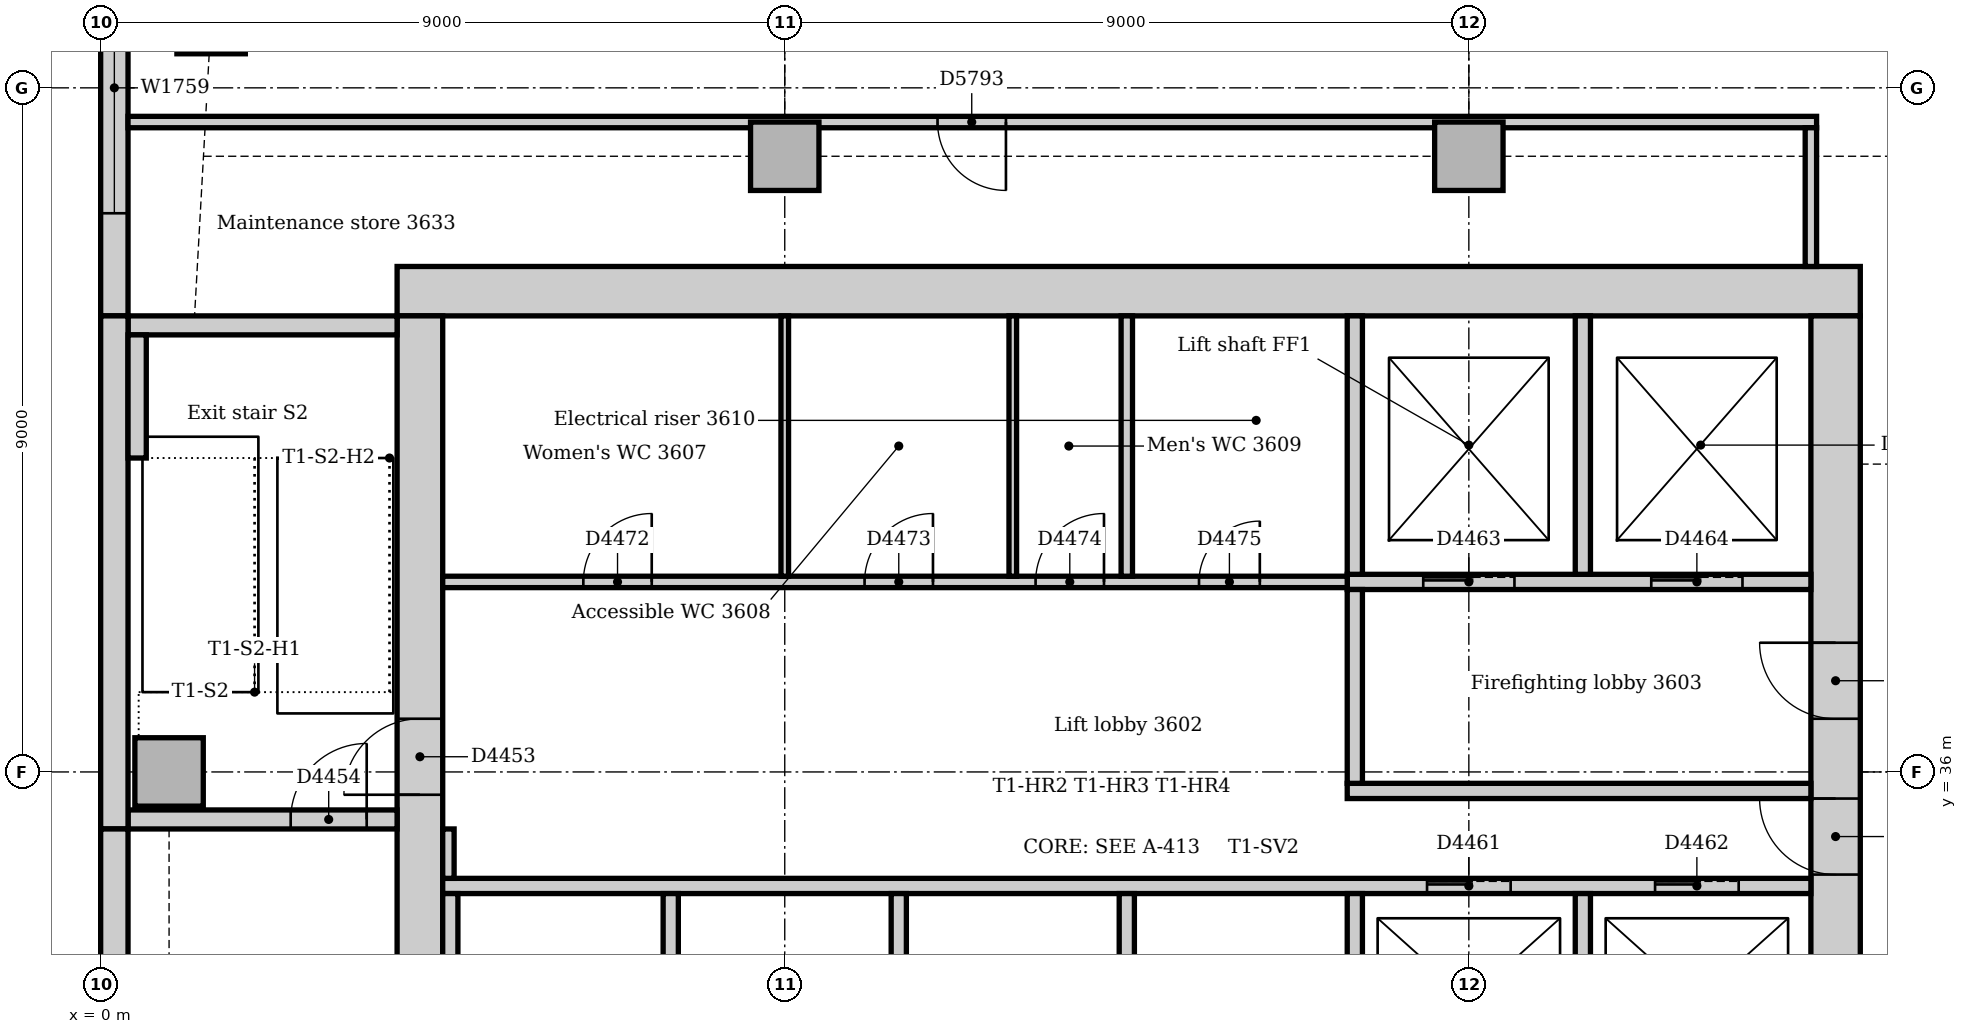
"""IFC4 building model, lengths in metres.
Left out: names, types, materials, properties, quantities, classifications, styles, units other than length and angle.
Written with IfcOpenShell. Run it as: python <this file> out.ifc"""

import sys

from ifc_helpers import new_model, si_unit, direction, frame, frame_2d, origin, origin_2d, place, context, subcontext, project, spatial, rectangle, extrude, element, fill, save


model = new_model("IFC4")
c1 = context("Model", 3, precision=1e-05, world=origin(), true_north=direction((0.0, 1.0)))
c2 = subcontext(c1, "Body", "Model", "MODEL_VIEW")
j1 = project(units=[si_unit("LENGTHUNIT", "METRE"), si_unit("PLANEANGLEUNIT", "RADIAN")], contexts=[c1])
p1 = place(None, origin())
s1 = spatial("IfcSite", under=j1, at=p1, CompositionType="ELEMENT")
p2 = place(p1, origin())
s2 = spatial("IfcBuilding", under=s1, at=p2, CompositionType="ELEMENT")
p3 = place(p2, frame((0.0, 0.0, 153.0)))
s3 = spatial("IfcBuildingStorey", under=s2, at=p3, CompositionType="ELEMENT", Elevation=153.0)
p4 = place(p3, frame((23.15, 42.325, 0.0), z_axis=(0.0, 0.0, 1.0), x_axis=(-1.0, 0.0, 0.0)))
e1 = element("IfcWall", 1, at=p4, inside=s3, PredefinedType="SOLIDWALL", context=c2, shape_type="SweptSolid", body=[
    extrude(rectangle(XDim=19.25, YDim=0.65, at=frame_2d((9.625, 0.0))), origin(), (0.0, 0.0, 1.0), 4.0),
])
p5 = place(p3, frame((22.825, 31.5, 0.0), z_axis=(0.0, 0.0, 1.0), x_axis=(0.0, 1.0, 0.0)))
e2 = element("IfcWall", 2, at=p5, inside=s3, PredefinedType="SOLIDWALL", context=c2, shape_type="SweptSolid", body=[
    extrude(rectangle(XDim=10.5, YDim=0.65, at=frame_2d((5.25, 0.0))), origin(), (0.0, 0.0, 1.0), 4.0),
])
p6 = place(p5, frame((3.15, 0.0, 0.0)))
e3 = element("IfcOpeningElement", 3, at=p6, cuts=e2, PredefinedType="OPENING", context=c2, shape_type="SweptSolid", body=[
    extrude(rectangle(XDim=1.0, YDim=2.1, at=frame_2d((0.5, 1.05))), frame((0.0, 0.335, 0.0), z_axis=(0.0, -1.0, 0.0), x_axis=(1.0, 0.0, 0.0)), (0.0, 0.0, 1.0), 0.67),
])
p7 = place(p5, frame((5.2, 0.0, 0.0)))
e4 = element("IfcOpeningElement", 4, at=p7, cuts=e2, PredefinedType="OPENING", context=c2, shape_type="SweptSolid", body=[
    extrude(rectangle(XDim=1.0, YDim=2.1, at=frame_2d((0.5, 1.05))), frame((0.0, 0.335, 0.0), z_axis=(0.0, -1.0, 0.0), x_axis=(1.0, 0.0, 0.0)), (0.0, 0.0, 1.0), 0.67),
])
p8 = place(p3, frame((4.2, 42.0, 0.0), z_axis=(0.0, 0.0, 1.0), x_axis=(0.0, -1.0, 0.0)))
e5 = element("IfcWall", 5, at=p8, inside=s3, PredefinedType="SOLIDWALL", context=c2, shape_type="SweptSolid", body=[
    extrude(rectangle(XDim=10.5, YDim=0.6, at=frame_2d((5.25, 0.0))), origin(), (0.0, 0.0, 1.0), 4.0),
])
p9 = place(p8, frame((5.3, 0.0, 0.0)))
e6 = element("IfcOpeningElement", 6, at=p9, cuts=e5, PredefinedType="OPENING", context=c2, shape_type="SweptSolid", body=[
    extrude(rectangle(XDim=1.0, YDim=2.1, at=frame_2d((0.5, 1.05))), frame((0.0, 0.31, 0.0), z_axis=(0.0, -1.0, 0.0), x_axis=(1.0, 0.0, 0.0)), (0.0, 0.0, 1.0), 0.62),
])
p10 = place(p3, frame((0.36, 35.375, 0.0), z_axis=(0.0, 0.0, 1.0), x_axis=(1.0, 0.0, 0.0)))
e7 = element("IfcWall", 7, at=p10, inside=s3, PredefinedType="SOLIDWALL", context=c2, shape_type="SweptSolid", body=[
    extrude(rectangle(XDim=3.54, YDim=0.25, at=frame_2d((1.77, 0.0))), origin(), (0.0, 0.0, 1.0), 4.0),
])
p11 = place(p10, frame((2.14, 0.0, 0.0)))
e8 = element("IfcOpeningElement", 8, at=p11, cuts=e7, PredefinedType="OPENING", context=c2, shape_type="SweptSolid", body=[
    extrude(rectangle(XDim=1.0, YDim=2.1, at=frame_2d((0.5, 1.05))), frame((0.0, 0.135, 0.0), z_axis=(0.0, -1.0, 0.0), x_axis=(1.0, 0.0, 0.0)), (0.0, 0.0, 1.0), 0.27),
])
p12 = place(p3, frame((3.9, 41.875, 0.0), z_axis=(0.0, 0.0, 1.0), x_axis=(-1.0, 0.0, 0.0)))
e9 = element("IfcWall", 9, at=p12, inside=s3, PredefinedType="SOLIDWALL", context=c2, shape_type="SweptSolid", body=[
    extrude(rectangle(XDim=3.54, YDim=0.25, at=frame_2d((1.77, 0.0))), origin(), (0.0, 0.0, 1.0), 4.0),
])
p13 = place(p3, frame((0.9, 36.0, 0.0), z_axis=(0.0, 0.0, 1.0), x_axis=(1.0, 0.0, 0.0)))
e10 = element("IfcColumn", 10, at=p13, inside=s3, PredefinedType="COLUMN", context=c2, shape_type="SweptSolid", body=[
    extrude(rectangle(XDim=0.9, YDim=0.9, at=origin_2d()), origin(), (0.0, 0.0, 1.0), 4.0),
])
for number, where, z_axis, x_axis in (
    (11, (1.453, 45.898, 0.0), (0.0, 0.0, 1.0), (1.0, 0.0, 0.0)),
    (12, (9.0, 44.1, 0.0), (0.0, 0.0, 1.0), (1.0, 0.0, 0.0)),
    (13, (18.0, 44.1, 0.0), (0.0, 0.0, 1.0), (1.0, 0.0, 0.0)),
):
    element("IfcColumn", number, at=place(p3, frame(where, z_axis=z_axis, x_axis=x_axis)), inside=s3, PredefinedType="COLUMN", context=c2, shape_type="SweptSolid", body=[
        extrude(rectangle(XDim=0.9, YDim=0.9, at=origin_2d()), origin(), (0.0, 0.0, 1.0), 3.85),
    ])
p14 = place(p3, frame((0.18, 49.757, 0.0), z_axis=(0.0, 0.0, 1.0), x_axis=(0.0, -1.0, 0.0)))
e14 = element("IfcWall", 14, at=p14, inside=s3, PredefinedType="STANDARD", context=c2, shape_type="SweptSolid", body=[
    extrude(rectangle(XDim=7.757, YDim=0.36, at=frame_2d((3.879, 0.0))), origin(), (0.0, 0.0, 1.0), 3.85),
])
p15 = place(p14, frame((3.107, 0.0, 0.9)))
e15 = element("IfcOpeningElement", 15, at=p15, cuts=e14, PredefinedType="OPENING", context=c2, shape_type="SweptSolid", body=[
    extrude(rectangle(XDim=3.3, YDim=1.6, at=frame_2d((1.65, 0.8))), frame((0.0, 0.19, 0.0), z_axis=(0.0, -1.0, 0.0), x_axis=(1.0, 0.0, 0.0)), (0.0, 0.0, 1.0), 0.38),
])
p16 = place(p3, frame((0.18, 42.0, 0.0), z_axis=(0.0, 0.0, 1.0), x_axis=(0.0, -1.0, 0.0)))
e16 = element("IfcWall", 16, at=p16, inside=s3, PredefinedType="STANDARD", context=c2, shape_type="SweptSolid", body=[
    extrude(rectangle(XDim=6.75, YDim=0.36, at=frame_2d((3.375, 0.0))), origin(), (0.0, 0.0, 1.0), 3.85),
])
p17 = place(p3, frame((0.18, 35.25, 0.0), z_axis=(0.0, 0.0, 1.0), x_axis=(0.0, -1.0, 0.0)))
e17 = element("IfcWall", 17, at=p17, inside=s3, PredefinedType="STANDARD", context=c2, shape_type="SweptSolid", body=[
    extrude(rectangle(XDim=7.5, YDim=0.36, at=frame_2d((3.75, 0.0))), origin(), (0.0, 0.0, 1.0), 3.85),
])
p18 = place(p3, frame((0.48, 40.13, 0.0), z_axis=(0.0, 0.0, 1.0), x_axis=(0.0, 1.0, 0.0)))
e18 = element("IfcWall", 18, at=p18, inside=s3, PredefinedType="STANDARD", context=c2, shape_type="SweptSolid", body=[
    extrude(rectangle(XDim=1.62, YDim=0.24, at=frame_2d((0.81, 0.0))), origin(), (0.0, 0.0, 1.0), 4.0),
])
p19 = place(p3, frame((16.4, 35.75, 0.0), z_axis=(0.0, 0.0, 1.0), x_axis=(1.0, 0.0, 0.0)))
e19 = element("IfcWall", 19, at=p19, inside=s3, PredefinedType="PARTITIONING", context=c2, shape_type="SweptSolid", body=[
    extrude(rectangle(XDim=6.1, YDim=0.2, at=frame_2d((3.05, 0.0))), origin(), (0.0, 0.0, 1.0), 3.85),
])
p20 = place(p3, frame((16.4, 38.5, 0.0), z_axis=(0.0, 0.0, 1.0), x_axis=(1.0, 0.0, 0.0)))
e20 = element("IfcWall", 20, at=p20, inside=s3, PredefinedType="PARTITIONING", context=c2, shape_type="SweptSolid", body=[
    extrude(rectangle(XDim=6.1, YDim=0.2, at=frame_2d((3.05, 0.0))), origin(), (0.0, 0.0, 1.0), 3.85),
])
p21 = place(p20, frame((1.0, 0.0, 0.0)))
e21 = element("IfcOpeningElement", 21, at=p21, cuts=e20, PredefinedType="OPENING", context=c2, shape_type="SweptSolid", body=[
    extrude(rectangle(XDim=1.2, YDim=2.1, at=frame_2d((0.6, 1.05))), frame((0.0, 0.11, 0.0), z_axis=(0.0, -1.0, 0.0), x_axis=(1.0, 0.0, 0.0)), (0.0, 0.0, 1.0), 0.22),
])
p22 = place(p20, frame((4.0, 0.0, 0.0)))
e22 = element("IfcOpeningElement", 22, at=p22, cuts=e20, PredefinedType="OPENING", context=c2, shape_type="SweptSolid", body=[
    extrude(rectangle(XDim=1.2, YDim=2.1, at=frame_2d((0.6, 1.05))), frame((0.0, 0.11, 0.0), z_axis=(0.0, -1.0, 0.0), x_axis=(1.0, 0.0, 0.0)), (0.0, 0.0, 1.0), 0.22),
])
p23 = place(p3, frame((16.5, 35.85, 0.0), z_axis=(0.0, 0.0, 1.0), x_axis=(0.0, 1.0, 0.0)))
e23 = element("IfcWall", 23, at=p23, inside=s3, PredefinedType="PARTITIONING", context=c2, shape_type="SweptSolid", body=[
    extrude(rectangle(XDim=2.55, YDim=0.2, at=frame_2d((1.275, 0.0))), origin(), (0.0, 0.0, 1.0), 3.85),
])
p24 = place(p3, frame((4.5, 34.5, 0.0), z_axis=(0.0, 0.0, 1.0), x_axis=(1.0, 0.0, 0.0)))
e24 = element("IfcWall", 24, at=p24, inside=s3, PredefinedType="PARTITIONING", context=c2, shape_type="SweptSolid", body=[
    extrude(rectangle(XDim=18.0, YDim=0.2, at=frame_2d((9.0, 0.0))), origin(), (0.0, 0.0, 1.0), 3.85),
])
p25 = place(p24, frame((12.95, 0.0, 0.0)))
e25 = element("IfcOpeningElement", 25, at=p25, cuts=e24, PredefinedType="OPENING", context=c2, shape_type="SweptSolid", body=[
    extrude(rectangle(XDim=1.1, YDim=2.1, at=frame_2d((0.55, 1.05))), frame((0.0, 0.11, 0.0), z_axis=(0.0, -1.0, 0.0), x_axis=(1.0, 0.0, 0.0)), (0.0, 0.0, 1.0), 0.22),
])
p26 = place(p24, frame((15.95, 0.0, 0.0)))
e26 = element("IfcOpeningElement", 26, at=p26, cuts=e24, PredefinedType="OPENING", context=c2, shape_type="SweptSolid", body=[
    extrude(rectangle(XDim=1.1, YDim=2.1, at=frame_2d((0.55, 1.05))), frame((0.0, 0.11, 0.0), z_axis=(0.0, -1.0, 0.0), x_axis=(1.0, 0.0, 0.0)), (0.0, 0.0, 1.0), 0.22),
])
for number, where, z_axis, x_axis in (
    (27, (4.6, 31.75, 0.0), (0.0, 0.0, 1.0), (0.0, 1.0, 0.0)),
    (28, (7.5, 31.75, 0.0), (0.0, 0.0, 1.0), (0.0, 1.0, 0.0)),
    (29, (10.5, 31.75, 0.0), (0.0, 0.0, 1.0), (0.0, 1.0, 0.0)),
    (30, (13.5, 31.75, 0.0), (0.0, 0.0, 1.0), (0.0, 1.0, 0.0)),
    (31, (16.5, 31.75, 0.0), (0.0, 0.0, 1.0), (0.0, 1.0, 0.0)),
    (32, (19.5, 31.75, 0.0), (0.0, 0.0, 1.0), (0.0, 1.0, 0.0)),
):
    element("IfcWall", number, at=place(p3, frame(where, z_axis=z_axis, x_axis=x_axis)), inside=s3, PredefinedType="PARTITIONING", context=c2, shape_type="SweptSolid", body=[
        extrude(rectangle(XDim=2.65, YDim=0.2, at=frame_2d((1.325, 0.0))), origin(), (0.0, 0.0, 1.0), 3.85),
    ])
for number, where, z_axis, x_axis in (
    (33, (16.5, 38.6, 0.0), (0.0, 0.0, 1.0), (0.0, 1.0, 0.0)),
    (34, (19.5, 38.6, 0.0), (0.0, 0.0, 1.0), (0.0, 1.0, 0.0)),
):
    element("IfcWall", number, at=place(p3, frame(where, z_axis=z_axis, x_axis=x_axis)), inside=s3, PredefinedType="PARTITIONING", context=c2, shape_type="SweptSolid", body=[
        extrude(rectangle(XDim=3.4, YDim=0.2, at=frame_2d((1.7, 0.0))), origin(), (0.0, 0.0, 1.0), 3.85),
    ])
p27 = place(p3, frame((0.36, 44.55, 0.0), z_axis=(0.0, 0.0, 1.0), x_axis=(1.0, 0.0, 0.0)))
e35 = element("IfcWall", 35, at=p27, inside=s3, PredefinedType="PARTITIONING", context=c2, shape_type="SweptSolid", body=[
    extrude(rectangle(XDim=22.215, YDim=0.15, at=frame_2d((11.107, 0.0))), origin(), (0.0, 0.0, 1.0), 3.85),
])
p28 = place(p27, frame((10.65, 0.0, 0.0)))
e36 = element("IfcOpeningElement", 36, at=p28, cuts=e35, PredefinedType="OPENING", context=c2, shape_type="SweptSolid", body=[
    extrude(rectangle(XDim=0.9, YDim=2.1, at=frame_2d((0.45, 1.05))), frame((0.0, 0.085, 0.0), z_axis=(0.0, -1.0, 0.0), x_axis=(1.0, 0.0, 0.0)), (0.0, 0.0, 1.0), 0.17),
])
p29 = place(p3, frame((4.5, 38.5, 0.0), z_axis=(0.0, 0.0, 1.0), x_axis=(1.0, 0.0, 0.0)))
e37 = element("IfcWall", 37, at=p29, inside=s3, PredefinedType="PARTITIONING", context=c2, shape_type="SweptSolid", body=[
    extrude(rectangle(XDim=11.9, YDim=0.15, at=frame_2d((5.95, 0.0))), origin(), (0.0, 0.0, 1.0), 3.85),
])
p30 = place(p29, frame((1.85, 0.0, 0.0)))
e38 = element("IfcOpeningElement", 38, at=p30, cuts=e37, PredefinedType="OPENING", context=c2, shape_type="SweptSolid", body=[
    extrude(rectangle(XDim=0.9, YDim=2.1, at=frame_2d((0.45, 1.05))), frame((0.0, 0.085, 0.0), z_axis=(0.0, -1.0, 0.0), x_axis=(1.0, 0.0, 0.0)), (0.0, 0.0, 1.0), 0.17),
])
p31 = place(p29, frame((5.55, 0.0, 0.0)))
e39 = element("IfcOpeningElement", 39, at=p31, cuts=e37, PredefinedType="OPENING", context=c2, shape_type="SweptSolid", body=[
    extrude(rectangle(XDim=0.9, YDim=2.1, at=frame_2d((0.45, 1.05))), frame((0.0, 0.085, 0.0), z_axis=(0.0, -1.0, 0.0), x_axis=(1.0, 0.0, 0.0)), (0.0, 0.0, 1.0), 0.17),
])
p32 = place(p29, frame((7.8, 0.0, 0.0)))
e40 = element("IfcOpeningElement", 40, at=p32, cuts=e37, PredefinedType="OPENING", context=c2, shape_type="SweptSolid", body=[
    extrude(rectangle(XDim=0.9, YDim=2.1, at=frame_2d((0.45, 1.05))), frame((0.0, 0.085, 0.0), z_axis=(0.0, -1.0, 0.0), x_axis=(1.0, 0.0, 0.0)), (0.0, 0.0, 1.0), 0.17),
])
p33 = place(p29, frame((9.95, 0.0, 0.0)))
e41 = element("IfcOpeningElement", 41, at=p33, cuts=e37, PredefinedType="OPENING", context=c2, shape_type="SweptSolid", body=[
    extrude(rectangle(XDim=0.8, YDim=2.1, at=frame_2d((0.4, 1.05))), frame((0.0, 0.085, 0.0), z_axis=(0.0, -1.0, 0.0), x_axis=(1.0, 0.0, 0.0)), (0.0, 0.0, 1.0), 0.17),
])
p34 = place(p3, frame((22.5, 42.65, 0.0), z_axis=(0.0, 0.0, 1.0), x_axis=(0.0, 1.0, 0.0)))
e42 = element("IfcWall", 42, at=p34, inside=s3, PredefinedType="PARTITIONING", context=c2, shape_type="SweptSolid", body=[
    extrude(rectangle(XDim=1.825, YDim=0.15, at=frame_2d((0.912, 0.0))), origin(), (0.0, 0.0, 1.0), 3.85),
])
p35 = place(p3, frame((4.575, 34.6, 0.0), z_axis=(0.0, 0.0, 1.0), x_axis=(0.0, 1.0, 0.0)))
e43 = element("IfcWall", 43, at=p35, inside=s3, PredefinedType="PARTITIONING", context=c2, shape_type="SweptSolid", body=[
    extrude(rectangle(XDim=0.65, YDim=0.15, at=frame_2d((0.325, 0.0))), origin(), (0.0, 0.0, 1.0), 3.85),
])
p36 = place(p3, frame((13.5, 38.575, 0.0), z_axis=(0.0, 0.0, 1.0), x_axis=(0.0, 1.0, 0.0)))
e44 = element("IfcWall", 44, at=p36, inside=s3, PredefinedType="PARTITIONING", context=c2, shape_type="SweptSolid", body=[
    extrude(rectangle(XDim=3.425, YDim=0.15, at=frame_2d((1.712, 0.0))), origin(), (0.0, 0.0, 1.0), 3.85),
])
for number, where, z_axis, x_axis in (
    (45, (9.0, 38.575, 0.0), (0.0, 0.0, 1.0), (0.0, 1.0, 0.0)),
    (46, (12.0, 38.575, 0.0), (0.0, 0.0, 1.0), (0.0, 1.0, 0.0)),
):
    element("IfcWall", number, at=place(p3, frame(where, z_axis=z_axis, x_axis=x_axis)), inside=s3, PredefinedType="PARTITIONING", context=c2, shape_type="SweptSolid", body=[
        extrude(rectangle(XDim=3.425, YDim=0.1, at=frame_2d((1.712, 0.0))), origin(), (0.0, 0.0, 1.0), 3.85),
    ])
p37 = place(p15, origin())
e47 = element("IfcWindow", 47, at=p37, inside=s3, PartitioningType="SINGLE_PANEL", PredefinedType="WINDOW", context=c2, shape_type="SweptSolid", body=[
    extrude(rectangle(XDim=3.3, YDim=1.6, at=frame_2d((1.65, 0.8))), frame((0.0, 0.13, 0.0), z_axis=(0.0, -1.0, 0.0), x_axis=(1.0, 0.0, 0.0)), (0.0, 0.0, 1.0), 0.06),
])
fill(e15, e47)
p38 = place(p9, frame((1.0, 0.0, 0.0), z_axis=(0.0, 0.0, 1.0), x_axis=(-1.0, 0.0, 0.0)))
e48 = element("IfcDoor", 48, at=p38, inside=s3, OperationType="SINGLE_SWING_LEFT", PredefinedType="DOOR", context=c2, shape_type="SweptSolid", body=[
    extrude(rectangle(XDim=1.0, YDim=2.1, at=frame_2d((0.5, 1.05))), frame((0.0, 0.025, 0.0), z_axis=(0.0, -1.0, 0.0), x_axis=(1.0, 0.0, 0.0)), (0.0, 0.0, 1.0), 0.05),
])
fill(e6, e48)
p39 = place(p11, origin())
e49 = element("IfcDoor", 49, at=p39, inside=s3, OperationType="SINGLE_SWING_RIGHT", PredefinedType="DOOR", context=c2, shape_type="SweptSolid", body=[
    extrude(rectangle(XDim=1.0, YDim=2.1, at=frame_2d((0.5, 1.05))), frame((0.0, 0.025, 0.0), z_axis=(0.0, -1.0, 0.0), x_axis=(1.0, 0.0, 0.0)), (0.0, 0.0, 1.0), 0.05),
])
fill(e8, e49)
p40 = place(p25, origin())
e50 = element("IfcDoor", 50, at=p40, inside=s3, OperationType="SLIDING_TO_LEFT", PredefinedType="DOOR", context=c2, shape_type="SweptSolid", body=[
    extrude(rectangle(XDim=1.1, YDim=2.1, at=frame_2d((0.55, 1.05))), frame((0.0, 0.025, 0.0), z_axis=(0.0, -1.0, 0.0), x_axis=(1.0, 0.0, 0.0)), (0.0, 0.0, 1.0), 0.05),
])
fill(e25, e50)
p41 = place(p26, origin())
e51 = element("IfcDoor", 51, at=p41, inside=s3, OperationType="SLIDING_TO_LEFT", PredefinedType="DOOR", context=c2, shape_type="SweptSolid", body=[
    extrude(rectangle(XDim=1.1, YDim=2.1, at=frame_2d((0.55, 1.05))), frame((0.0, 0.025, 0.0), z_axis=(0.0, -1.0, 0.0), x_axis=(1.0, 0.0, 0.0)), (0.0, 0.0, 1.0), 0.05),
])
fill(e26, e51)
p42 = place(p21, origin())
e52 = element("IfcDoor", 52, at=p42, inside=s3, OperationType="SLIDING_TO_LEFT", PredefinedType="DOOR", context=c2, shape_type="SweptSolid", body=[
    extrude(rectangle(XDim=1.2, YDim=2.1, at=frame_2d((0.6, 1.05))), frame((0.0, 0.025, 0.0), z_axis=(0.0, -1.0, 0.0), x_axis=(1.0, 0.0, 0.0)), (0.0, 0.0, 1.0), 0.05),
])
fill(e21, e52)
p43 = place(p22, origin())
e53 = element("IfcDoor", 53, at=p43, inside=s3, OperationType="SLIDING_TO_LEFT", PredefinedType="DOOR", context=c2, shape_type="SweptSolid", body=[
    extrude(rectangle(XDim=1.2, YDim=2.1, at=frame_2d((0.6, 1.05))), frame((0.0, 0.025, 0.0), z_axis=(0.0, -1.0, 0.0), x_axis=(1.0, 0.0, 0.0)), (0.0, 0.0, 1.0), 0.05),
])
fill(e22, e53)
p44 = place(p6, origin())
e54 = element("IfcDoor", 54, at=p44, inside=s3, OperationType="SINGLE_SWING_RIGHT", PredefinedType="DOOR", context=c2, shape_type="SweptSolid", body=[
    extrude(rectangle(XDim=1.0, YDim=2.1, at=frame_2d((0.5, 1.05))), frame((0.0, 0.025, 0.0), z_axis=(0.0, -1.0, 0.0), x_axis=(1.0, 0.0, 0.0)), (0.0, 0.0, 1.0), 0.05),
])
fill(e3, e54)
p45 = place(p7, origin())
e55 = element("IfcDoor", 55, at=p45, inside=s3, OperationType="SINGLE_SWING_RIGHT", PredefinedType="DOOR", context=c2, shape_type="SweptSolid", body=[
    extrude(rectangle(XDim=1.0, YDim=2.1, at=frame_2d((0.5, 1.05))), frame((0.0, 0.025, 0.0), z_axis=(0.0, -1.0, 0.0), x_axis=(1.0, 0.0, 0.0)), (0.0, 0.0, 1.0), 0.05),
])
fill(e4, e55)
p46 = place(p30, origin())
e56 = element("IfcDoor", 56, at=p46, inside=s3, OperationType="SINGLE_SWING_RIGHT", PredefinedType="DOOR", context=c2, shape_type="SweptSolid", body=[
    extrude(rectangle(XDim=0.9, YDim=2.1, at=frame_2d((0.45, 1.05))), frame((0.0, 0.025, 0.0), z_axis=(0.0, -1.0, 0.0), x_axis=(1.0, 0.0, 0.0)), (0.0, 0.0, 1.0), 0.05),
])
fill(e38, e56)
p47 = place(p31, origin())
e57 = element("IfcDoor", 57, at=p47, inside=s3, OperationType="SINGLE_SWING_RIGHT", PredefinedType="DOOR", context=c2, shape_type="SweptSolid", body=[
    extrude(rectangle(XDim=0.9, YDim=2.1, at=frame_2d((0.45, 1.05))), frame((0.0, 0.025, 0.0), z_axis=(0.0, -1.0, 0.0), x_axis=(1.0, 0.0, 0.0)), (0.0, 0.0, 1.0), 0.05),
])
fill(e39, e57)
p48 = place(p32, origin())
e58 = element("IfcDoor", 58, at=p48, inside=s3, OperationType="SINGLE_SWING_RIGHT", PredefinedType="DOOR", context=c2, shape_type="SweptSolid", body=[
    extrude(rectangle(XDim=0.9, YDim=2.1, at=frame_2d((0.45, 1.05))), frame((0.0, 0.025, 0.0), z_axis=(0.0, -1.0, 0.0), x_axis=(1.0, 0.0, 0.0)), (0.0, 0.0, 1.0), 0.05),
])
fill(e40, e58)
p49 = place(p33, origin())
e59 = element("IfcDoor", 59, at=p49, inside=s3, OperationType="SINGLE_SWING_RIGHT", PredefinedType="DOOR", context=c2, shape_type="SweptSolid", body=[
    extrude(rectangle(XDim=0.8, YDim=2.1, at=frame_2d((0.4, 1.05))), frame((0.0, 0.025, 0.0), z_axis=(0.0, -1.0, 0.0), x_axis=(1.0, 0.0, 0.0)), (0.0, 0.0, 1.0), 0.05),
])
fill(e41, e59)
p50 = place(p28, frame((0.9, 0.0, 0.0), z_axis=(0.0, 0.0, 1.0), x_axis=(-1.0, 0.0, 0.0)))
e60 = element("IfcDoor", 60, at=p50, inside=s3, OperationType="SINGLE_SWING_LEFT", PredefinedType="DOOR", context=c2, shape_type="SweptSolid", body=[
    extrude(rectangle(XDim=0.9, YDim=2.1, at=frame_2d((0.45, 1.05))), frame((0.0, 0.025, 0.0), z_axis=(0.0, -1.0, 0.0), x_axis=(1.0, 0.0, 0.0)), (0.0, 0.0, 1.0), 0.05),
])
fill(e36, e60)
save(model, sys.argv[1])
